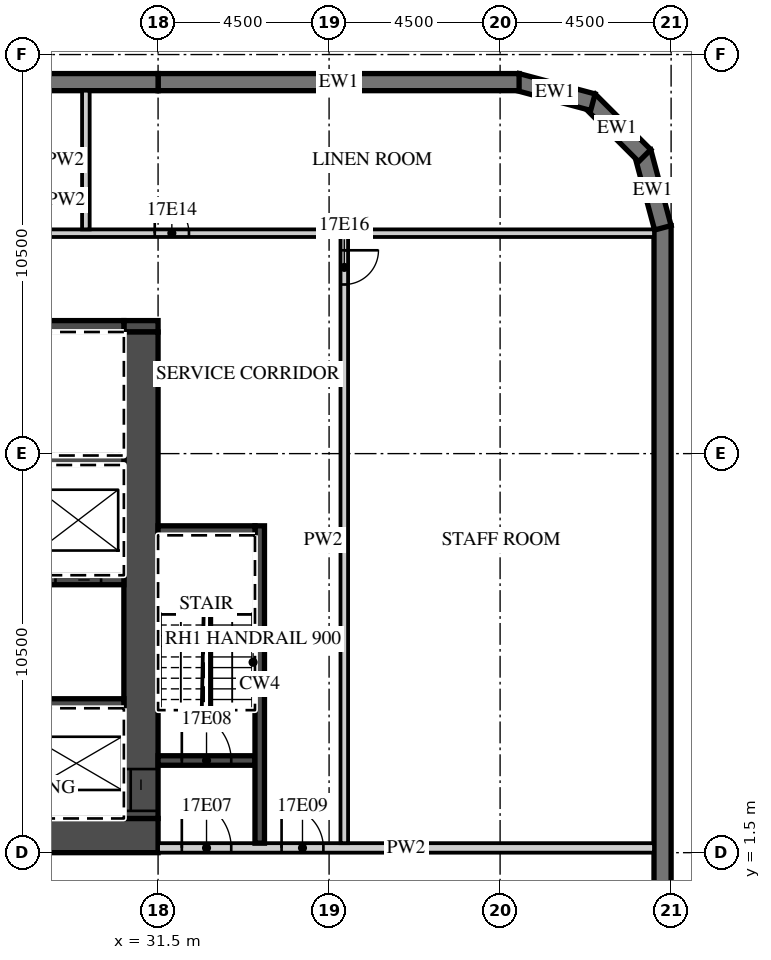
"""IFC4 building model, lengths in metres.
Left out: names, types, materials, properties, quantities, classifications, styles, units other than length and angle.
Written with IfcOpenShell. Run it as: python <this file> out.ifc"""

import sys

from ifc_helpers import new_model, si_unit, direction, frame, frame_2d, origin, place, context, subcontext, project, spatial, polyline, rectangle, outline, extrude, element, fill, save


model = new_model("IFC4")
c1 = context("Model", 3, precision=1e-05, world=origin(), true_north=direction((0.0, 1.0)))
c2 = subcontext(c1, "Body", "Model", "MODEL_VIEW")
j1 = project(units=[si_unit("LENGTHUNIT", "METRE"), si_unit("PLANEANGLEUNIT", "RADIAN")], contexts=[c1])
p1 = place(None, origin())
s1 = spatial("IfcSite", under=j1, at=p1, CompositionType="ELEMENT")
p2 = place(p1, origin())
s2 = spatial("IfcBuilding", under=s1, at=p2, CompositionType="ELEMENT")
p3 = place(p2, frame((0.0, 0.0, 86.4)))
s3 = spatial("IfcBuildingStorey", under=s2, at=p3, CompositionType="ELEMENT", Elevation=86.4)
p4 = place(p3, frame((44.775, -18.0, 0.0), z_axis=(0.0, 0.0, 1.0), x_axis=(0.0, 1.0, 0.0)))
e1 = element("IfcWall", 1, at=p4, inside=s3, PredefinedType="SOLIDWALL", context=c2, shape_type="SweptSolid", body=[
    extrude(rectangle(XDim=36.0, YDim=0.45, at=frame_2d((18.0, 0.0))), origin(), (0.0, 0.0, 1.0), 3.02),
])
p5 = place(p4, frame((3.9, 0.0, 0.45)))
e2 = element("IfcOpeningElement", 2, at=p5, cuts=e1, PredefinedType="OPENING", context=c2, shape_type="SweptSolid", body=[
    extrude(rectangle(XDim=3.3, YDim=2.25, at=frame_2d((1.65, 1.125))), frame((0.0, 0.235, 0.0), z_axis=(0.0, -1.0, 0.0), x_axis=(1.0, 0.0, 0.0)), (0.0, 0.0, 1.0), 0.47),
])
p6 = place(p4, frame((8.4, 0.0, 0.45)))
e3 = element("IfcOpeningElement", 3, at=p6, cuts=e1, PredefinedType="OPENING", context=c2, shape_type="SweptSolid", body=[
    extrude(rectangle(XDim=3.3, YDim=2.25, at=frame_2d((1.65, 1.125))), frame((0.0, 0.235, 0.0), z_axis=(0.0, -1.0, 0.0), x_axis=(1.0, 0.0, 0.0)), (0.0, 0.0, 1.0), 0.47),
])
p7 = place(p4, frame((12.9, 0.0, 0.45)))
e4 = element("IfcOpeningElement", 4, at=p7, cuts=e1, PredefinedType="OPENING", context=c2, shape_type="SweptSolid", body=[
    extrude(rectangle(XDim=3.3, YDim=2.25, at=frame_2d((1.65, 1.125))), frame((0.0, 0.235, 0.0), z_axis=(0.0, -1.0, 0.0), x_axis=(1.0, 0.0, 0.0)), (0.0, 0.0, 1.0), 0.47),
])
p8 = place(p3, frame((44.783, 17.942, 0.0), z_axis=(0.0, 0.0, 1.0), x_axis=(-0.25881466832, 0.965926999034, 0.0)))
e5 = element("IfcWall", 5, at=p8, inside=s3, PredefinedType="SOLIDWALL", context=c2, shape_type="SweptSolid", body=[
    extrude(outline(polyline([(0.0, -0.225), (2.071, -0.225), (1.95, 0.225), (0.121, 0.225), (0.0, -0.225)])), origin(), (0.0, 0.0, 1.0), 3.02),
])
p9 = place(p3, frame((44.305, 19.841, 0.0), z_axis=(0.0, 0.0, 1.0), x_axis=(-0.707106781187, 0.707106781187, 0.0)))
e6 = element("IfcWall", 6, at=p9, inside=s3, PredefinedType="SOLIDWALL", context=c2, shape_type="SweptSolid", body=[
    extrude(outline(polyline([(0.0, -0.225), (2.071, -0.225), (1.95, 0.225), (0.121, 0.225), (0.0, -0.225)])), origin(), (0.0, 0.0, 1.0), 3.02),
])
p10 = place(p3, frame((42.942, 21.247, 0.0), z_axis=(0.0, 0.0, 1.0), x_axis=(-0.965926999034, 0.25881466832, 0.0)))
e7 = element("IfcWall", 7, at=p10, inside=s3, PredefinedType="SOLIDWALL", context=c2, shape_type="SweptSolid", body=[
    extrude(outline(polyline([(-0.0, -0.225), (2.07, -0.225), (1.95, 0.225), (0.12, 0.225), (-0.0, -0.225)])), origin(), (0.0, 0.0, 1.0), 3.02),
])
p11 = place(p3, frame((41.0, 21.775, 0.0), z_axis=(0.0, 0.0, 1.0), x_axis=(-1.0, 0.0, 0.0)))
e8 = element("IfcWall", 8, at=p11, inside=s3, PredefinedType="SOLIDWALL", context=c2, shape_type="SweptSolid", body=[
    extrude(rectangle(XDim=9.5, YDim=0.45, at=frame_2d((4.75, 0.0))), origin(), (0.0, 0.0, 1.0), 3.02),
])
p12 = place(p3, frame((31.5, 21.775, 0.0), z_axis=(0.0, 0.0, 1.0), x_axis=(-1.0, 0.0, 0.0)))
e9 = element("IfcWall", 9, at=p12, inside=s3, PredefinedType="SOLIDWALL", context=c2, shape_type="SweptSolid", body=[
    extrude(rectangle(XDim=18.0, YDim=0.45, at=frame_2d((9.0, 0.0))), origin(), (0.0, 0.0, 1.0), 3.02),
])
p13 = place(p3, frame((13.5, 1.95, 0.0), z_axis=(0.0, 0.0, 1.0), x_axis=(1.0, 0.0, 0.0)))
e10 = element("IfcWall", 10, at=p13, inside=s3, PredefinedType="SHEAR", context=c2, shape_type="SweptSolid", body=[
    extrude(rectangle(XDim=18.0, YDim=0.9, at=frame_2d((9.0, 0.0))), origin(), (0.0, 0.0, 1.0), 3.02),
])
p14 = place(p13, frame((1.475, 0.0, 0.0)))
e11 = element("IfcOpeningElement", 11, at=p14, cuts=e10, PredefinedType="OPENING", context=c2, shape_type="SweptSolid", body=[
    extrude(rectangle(XDim=1.8, YDim=2.1, at=frame_2d((0.9, 1.05))), frame((0.0, 0.46, 0.0), z_axis=(0.0, -1.0, 0.0), x_axis=(1.0, 0.0, 0.0)), (0.0, 0.0, 1.0), 0.92),
])
p15 = place(p3, frame((30.6, 15.35, 0.0), z_axis=(0.0, 0.0, 1.0), x_axis=(1.0, 0.0, 0.0)))
e12 = element("IfcWall", 12, at=p15, inside=s3, PredefinedType="SHEAR", context=c2, shape_type="SweptSolid", body=[
    extrude(rectangle(XDim=0.9, YDim=0.3, at=frame_2d((0.45, 0.0))), origin(), (0.0, 0.0, 1.0), 3.02),
])
p16 = place(p3, frame((20.3, 15.35, 0.0), z_axis=(0.0, 0.0, 1.0), x_axis=(1.0, 0.0, 0.0)))
e13 = element("IfcWall", 13, at=p16, inside=s3, PredefinedType="SHEAR", context=c2, shape_type="SweptSolid", body=[
    extrude(rectangle(XDim=10.3, YDim=0.3, at=frame_2d((5.15, 0.0))), origin(), (0.0, 0.0, 1.0), 3.02),
])
p17 = place(p16, frame((4.0, 0.0, 0.0)))
e14 = element("IfcOpeningElement", 14, at=p17, cuts=e13, PredefinedType="OPENING", context=c2, shape_type="SweptSolid", body=[
    extrude(rectangle(XDim=1.3, YDim=2.1, at=frame_2d((0.65, 1.05))), frame((0.0, 0.16, 0.0), z_axis=(0.0, -1.0, 0.0), x_axis=(1.0, 0.0, 0.0)), (0.0, 0.0, 1.0), 0.32),
])
p18 = place(p16, frame((2.288, 0.0, 0.0)))
e15 = element("IfcOpeningElement", 15, at=p18, cuts=e13, PredefinedType="OPENING", context=c2, shape_type="SweptSolid", body=[
    extrude(rectangle(XDim=0.9, YDim=2.1, at=frame_2d((0.45, 1.05))), frame((0.0, 0.16, 0.0), z_axis=(0.0, -1.0, 0.0), x_axis=(1.0, 0.0, 0.0)), (0.0, 0.0, 1.0), 0.32),
])
p19 = place(p16, frame((0.462, 0.0, 0.0)))
e16 = element("IfcOpeningElement", 16, at=p19, cuts=e13, PredefinedType="OPENING", context=c2, shape_type="SweptSolid", body=[
    extrude(rectangle(XDim=0.9, YDim=2.1, at=frame_2d((0.45, 1.05))), frame((0.0, 0.16, 0.0), z_axis=(0.0, -1.0, 0.0), x_axis=(1.0, 0.0, 0.0)), (0.0, 0.0, 1.0), 0.32),
])
p20 = place(p3, frame((31.05, 2.4, 0.0), z_axis=(0.0, 0.0, 1.0), x_axis=(0.0, 1.0, 0.0)))
e17 = element("IfcWall", 17, at=p20, inside=s3, PredefinedType="SHEAR", context=c2, shape_type="SweptSolid", body=[
    extrude(rectangle(XDim=12.8, YDim=0.9, at=frame_2d((6.4, 0.0))), origin(), (0.0, 0.0, 1.0), 3.02),
])
p21 = place(p20, frame((0.2, 0.0, 0.0)))
e18 = element("IfcOpeningElement", 18, at=p21, cuts=e17, PredefinedType="OPENING", context=c2, shape_type="SweptSolid", body=[
    extrude(rectangle(XDim=1.1, YDim=2.1, at=frame_2d((0.55, 1.05))), frame((0.0, 0.46, 0.0), z_axis=(0.0, -1.0, 0.0), x_axis=(1.0, 0.0, 0.0)), (0.0, 0.0, 1.0), 0.92),
])
p22 = place(p3, frame((17.6, 5.425, 0.0), z_axis=(0.0, 0.0, 1.0), x_axis=(1.0, 0.0, 0.0)))
e19 = element("IfcWall", 19, at=p22, inside=s3, PredefinedType="SHEAR", context=c2, shape_type="SweptSolid", body=[
    extrude(rectangle(XDim=13.0, YDim=0.25, at=frame_2d((6.5, 0.0))), origin(), (0.0, 0.0, 1.0), 3.02),
])
p23 = place(p3, frame((14.4, 8.675, 0.0), z_axis=(0.0, 0.0, 1.0), x_axis=(1.0, 0.0, 0.0)))
e20 = element("IfcWall", 20, at=p23, inside=s3, PredefinedType="SHEAR", context=c2, shape_type="SweptSolid", body=[
    extrude(rectangle(XDim=16.2, YDim=0.25, at=frame_2d((8.1, 0.0))), origin(), (0.0, 0.0, 1.0), 3.02),
])
p24 = place(p23, frame((14.4, 0.0, 0.0)))
e21 = element("IfcOpeningElement", 21, at=p24, cuts=e20, PredefinedType="OPENING", context=c2, shape_type="SweptSolid", body=[
    extrude(rectangle(XDim=1.2, YDim=2.1, at=frame_2d((0.6, 1.05))), frame((0.0, 0.135, 0.0), z_axis=(0.0, -1.0, 0.0), x_axis=(1.0, 0.0, 0.0)), (0.0, 0.0, 1.0), 0.27),
])
p25 = place(p23, frame((11.75, 0.0, 0.0)))
e22 = element("IfcOpeningElement", 22, at=p25, cuts=e20, PredefinedType="OPENING", context=c2, shape_type="SweptSolid", body=[
    extrude(rectangle(XDim=1.2, YDim=2.1, at=frame_2d((0.6, 1.05))), frame((0.0, 0.135, 0.0), z_axis=(0.0, -1.0, 0.0), x_axis=(1.0, 0.0, 0.0)), (0.0, 0.0, 1.0), 0.27),
])
p26 = place(p23, frame((9.1, 0.0, 0.0)))
e23 = element("IfcOpeningElement", 23, at=p26, cuts=e20, PredefinedType="OPENING", context=c2, shape_type="SweptSolid", body=[
    extrude(rectangle(XDim=1.2, YDim=2.1, at=frame_2d((0.6, 1.05))), frame((0.0, 0.135, 0.0), z_axis=(0.0, -1.0, 0.0), x_axis=(1.0, 0.0, 0.0)), (0.0, 0.0, 1.0), 0.27),
])
p27 = place(p23, frame((0.65, 0.0, 0.0)))
e24 = element("IfcOpeningElement", 24, at=p27, cuts=e20, PredefinedType="OPENING", context=c2, shape_type="SweptSolid", body=[
    extrude(rectangle(XDim=1.3, YDim=2.1, at=frame_2d((0.65, 1.05))), frame((0.0, 0.135, 0.0), z_axis=(0.0, -1.0, 0.0), x_axis=(1.0, 0.0, 0.0)), (0.0, 0.0, 1.0), 0.27),
])
p28 = place(p3, frame((17.35, 11.825, 0.0), z_axis=(0.0, 0.0, 1.0), x_axis=(1.0, 0.0, 0.0)))
e25 = element("IfcWall", 25, at=p28, inside=s3, PredefinedType="SHEAR", context=c2, shape_type="SweptSolid", body=[
    extrude(rectangle(XDim=13.25, YDim=0.25, at=frame_2d((6.625, 0.0))), origin(), (0.0, 0.0, 1.0), 3.02),
])
p29 = place(p3, frame((31.5, 1.625, 0.0), z_axis=(0.0, 0.0, 1.0), x_axis=(1.0, 0.0, 0.0)))
e26 = element("IfcWall", 26, at=p29, inside=s3, PredefinedType="PARTITIONING", context=c2, shape_type="SweptSolid", body=[
    extrude(rectangle(XDim=13.05, YDim=0.25, at=frame_2d((6.525, 0.0))), origin(), (0.0, 0.0, 1.0), 3.02),
])
p30 = place(p29, frame((0.625, 0.0, 0.0)))
e27 = element("IfcOpeningElement", 27, at=p30, cuts=e26, PredefinedType="OPENING", context=c2, shape_type="SweptSolid", body=[
    extrude(rectangle(XDim=1.3, YDim=2.1, at=frame_2d((0.65, 1.05))), frame((0.0, 0.135, 0.0), z_axis=(0.0, -1.0, 0.0), x_axis=(1.0, 0.0, 0.0)), (0.0, 0.0, 1.0), 0.27),
])
p31 = place(p29, frame((3.25, 0.0, 0.0)))
e28 = element("IfcOpeningElement", 28, at=p31, cuts=e26, PredefinedType="OPENING", context=c2, shape_type="SweptSolid", body=[
    extrude(rectangle(XDim=1.1, YDim=2.1, at=frame_2d((0.55, 1.05))), frame((0.0, 0.135, 0.0), z_axis=(0.0, -1.0, 0.0), x_axis=(1.0, 0.0, 0.0)), (0.0, 0.0, 1.0), 0.27),
])
p32 = place(p3, frame((31.5, 3.925, 0.0), z_axis=(0.0, 0.0, 1.0), x_axis=(1.0, 0.0, 0.0)))
e29 = element("IfcWall", 29, at=p32, inside=s3, PredefinedType="SHEAR", context=c2, shape_type="SweptSolid", body=[
    extrude(rectangle(XDim=2.55, YDim=0.25, at=frame_2d((1.275, 0.0))), origin(), (0.0, 0.0, 1.0), 3.02),
])
p33 = place(p32, frame((0.625, 0.0, 0.0)))
e30 = element("IfcOpeningElement", 30, at=p33, cuts=e29, PredefinedType="OPENING", context=c2, shape_type="SweptSolid", body=[
    extrude(rectangle(XDim=1.3, YDim=2.1, at=frame_2d((0.65, 1.05))), frame((0.0, 0.135, 0.0), z_axis=(0.0, -1.0, 0.0), x_axis=(1.0, 0.0, 0.0)), (0.0, 0.0, 1.0), 0.27),
])
p34 = place(p3, frame((34.175, 1.75, 0.0), z_axis=(0.0, 0.0, 1.0), x_axis=(0.0, 1.0, 0.0)))
e31 = element("IfcWall", 31, at=p34, inside=s3, PredefinedType="SHEAR", context=c2, shape_type="SweptSolid", body=[
    extrude(rectangle(XDim=8.35, YDim=0.25, at=frame_2d((4.175, 0.0))), origin(), (0.0, 0.0, 1.0), 3.02),
])
p35 = place(p3, frame((31.5, 9.975, 0.0), z_axis=(0.0, 0.0, 1.0), x_axis=(1.0, 0.0, 0.0)))
e32 = element("IfcWall", 32, at=p35, inside=s3, PredefinedType="SHEAR", context=c2, shape_type="SweptSolid", body=[
    extrude(rectangle(XDim=2.55, YDim=0.25, at=frame_2d((1.275, 0.0))), origin(), (0.0, 0.0, 1.0), 3.02),
])
p36 = place(p3, frame((36.4, 1.75, 0.0), z_axis=(0.0, 0.0, 1.0), x_axis=(0.0, 1.0, 0.0)))
e33 = element("IfcWall", 33, at=p36, inside=s3, PredefinedType="PARTITIONING", context=c2, shape_type="SweptSolid", body=[
    extrude(rectangle(XDim=15.95, YDim=0.2, at=frame_2d((7.975, 0.0))), origin(), (0.0, 0.0, 1.0), 3.02),
])
p37 = place(p36, frame((14.7, 0.0, 0.0)))
e34 = element("IfcOpeningElement", 34, at=p37, cuts=e33, PredefinedType="OPENING", context=c2, shape_type="SweptSolid", body=[
    extrude(rectangle(XDim=0.9, YDim=2.1, at=frame_2d((0.45, 1.05))), frame((0.0, 0.11, 0.0), z_axis=(0.0, -1.0, 0.0), x_axis=(1.0, 0.0, 0.0)), (0.0, 0.0, 1.0), 0.22),
])
p38 = place(p3, frame((13.6, 17.8, 0.0), z_axis=(0.0, 0.0, 1.0), x_axis=(1.0, 0.0, 0.0)))
e35 = element("IfcWall", 35, at=p38, inside=s3, PredefinedType="PARTITIONING", context=c2, shape_type="SweptSolid", body=[
    extrude(rectangle(XDim=30.95, YDim=0.2, at=frame_2d((15.475, 0.0))), origin(), (0.0, 0.0, 1.0), 3.02),
])
p39 = place(p38, frame((17.812, 0.0, 0.0)))
e36 = element("IfcOpeningElement", 36, at=p39, cuts=e35, PredefinedType="OPENING", context=c2, shape_type="SweptSolid", body=[
    extrude(rectangle(XDim=0.9, YDim=2.1, at=frame_2d((0.45, 1.05))), frame((0.0, 0.11, 0.0), z_axis=(0.0, -1.0, 0.0), x_axis=(1.0, 0.0, 0.0)), (0.0, 0.0, 1.0), 0.22),
])
p40 = place(p38, frame((9.512, 0.0, 0.0)))
e37 = element("IfcOpeningElement", 37, at=p40, cuts=e35, PredefinedType="OPENING", context=c2, shape_type="SweptSolid", body=[
    extrude(rectangle(XDim=0.9, YDim=2.1, at=frame_2d((0.45, 1.05))), frame((0.0, 0.11, 0.0), z_axis=(0.0, -1.0, 0.0), x_axis=(1.0, 0.0, 0.0)), (0.0, 0.0, 1.0), 0.22),
])
p41 = place(p3, frame((29.6, 17.9, 0.0), z_axis=(0.0, 0.0, 1.0), x_axis=(0.0, 1.0, 0.0)))
e38 = element("IfcWall", 38, at=p41, inside=s3, PredefinedType="PARTITIONING", context=c2, shape_type="SweptSolid", body=[
    extrude(rectangle(XDim=3.65, YDim=0.2, at=frame_2d((1.825, 0.0))), origin(), (0.0, 0.0, 1.0), 3.02),
])
p42 = place(p24, origin())
e39 = element("IfcDoor", 39, at=p42, inside=s3, OperationType="SLIDING_TO_LEFT", PredefinedType="DOOR", context=c2, shape_type="SweptSolid", body=[
    extrude(rectangle(XDim=1.2, YDim=2.1, at=frame_2d((0.6, 1.05))), frame((0.0, 0.025, 0.0), z_axis=(0.0, -1.0, 0.0), x_axis=(1.0, 0.0, 0.0)), (0.0, 0.0, 1.0), 0.05),
])
fill(e21, e39)
p43 = place(p21, origin())
e40 = element("IfcDoor", 40, at=p43, inside=s3, OperationType="SLIDING_TO_LEFT", PredefinedType="DOOR", context=c2, shape_type="SweptSolid", body=[
    extrude(rectangle(XDim=1.1, YDim=2.1, at=frame_2d((0.55, 1.05))), frame((0.0, 0.025, 0.0), z_axis=(0.0, -1.0, 0.0), x_axis=(1.0, 0.0, 0.0)), (0.0, 0.0, 1.0), 0.05),
])
fill(e18, e40)
p44 = place(p30, origin())
e41 = element("IfcDoor", 41, at=p44, inside=s3, OperationType="SINGLE_SWING_LEFT", PredefinedType="DOOR", context=c2, shape_type="SweptSolid", body=[
    extrude(rectangle(XDim=1.3, YDim=2.1, at=frame_2d((0.65, 1.05))), frame((0.0, 0.025, 0.0), z_axis=(0.0, -1.0, 0.0), x_axis=(1.0, 0.0, 0.0)), (0.0, 0.0, 1.0), 0.05),
])
fill(e27, e41)
p45 = place(p33, origin())
e42 = element("IfcDoor", 42, at=p45, inside=s3, OperationType="SINGLE_SWING_LEFT", PredefinedType="DOOR", context=c2, shape_type="SweptSolid", body=[
    extrude(rectangle(XDim=1.3, YDim=2.1, at=frame_2d((0.65, 1.05))), frame((0.0, 0.025, 0.0), z_axis=(0.0, -1.0, 0.0), x_axis=(1.0, 0.0, 0.0)), (0.0, 0.0, 1.0), 0.05),
])
fill(e30, e42)
p46 = place(p31, origin())
e43 = element("IfcDoor", 43, at=p46, inside=s3, OperationType="SINGLE_SWING_LEFT", PredefinedType="DOOR", context=c2, shape_type="SweptSolid", body=[
    extrude(rectangle(XDim=1.1, YDim=2.1, at=frame_2d((0.55, 1.05))), frame((0.0, 0.025, 0.0), z_axis=(0.0, -1.0, 0.0), x_axis=(1.0, 0.0, 0.0)), (0.0, 0.0, 1.0), 0.05),
])
fill(e28, e43)
p47 = place(p39, origin())
e44 = element("IfcDoor", 44, at=p47, inside=s3, OperationType="SINGLE_SWING_LEFT", PredefinedType="DOOR", context=c2, shape_type="SweptSolid", body=[
    extrude(rectangle(XDim=0.9, YDim=2.1, at=frame_2d((0.45, 1.05))), frame((0.0, 0.025, 0.0), z_axis=(0.0, -1.0, 0.0), x_axis=(1.0, 0.0, 0.0)), (0.0, 0.0, 1.0), 0.05),
])
fill(e36, e44)
p48 = place(p37, origin())
e45 = element("IfcDoor", 45, at=p48, inside=s3, OperationType="SINGLE_SWING_RIGHT", PredefinedType="DOOR", context=c2, shape_type="SweptSolid", body=[
    extrude(rectangle(XDim=0.9, YDim=2.1, at=frame_2d((0.45, 1.05))), frame((0.0, 0.025, 0.0), z_axis=(0.0, -1.0, 0.0), x_axis=(1.0, 0.0, 0.0)), (0.0, 0.0, 1.0), 0.05),
])
fill(e34, e45)
save(model, sys.argv[1])
